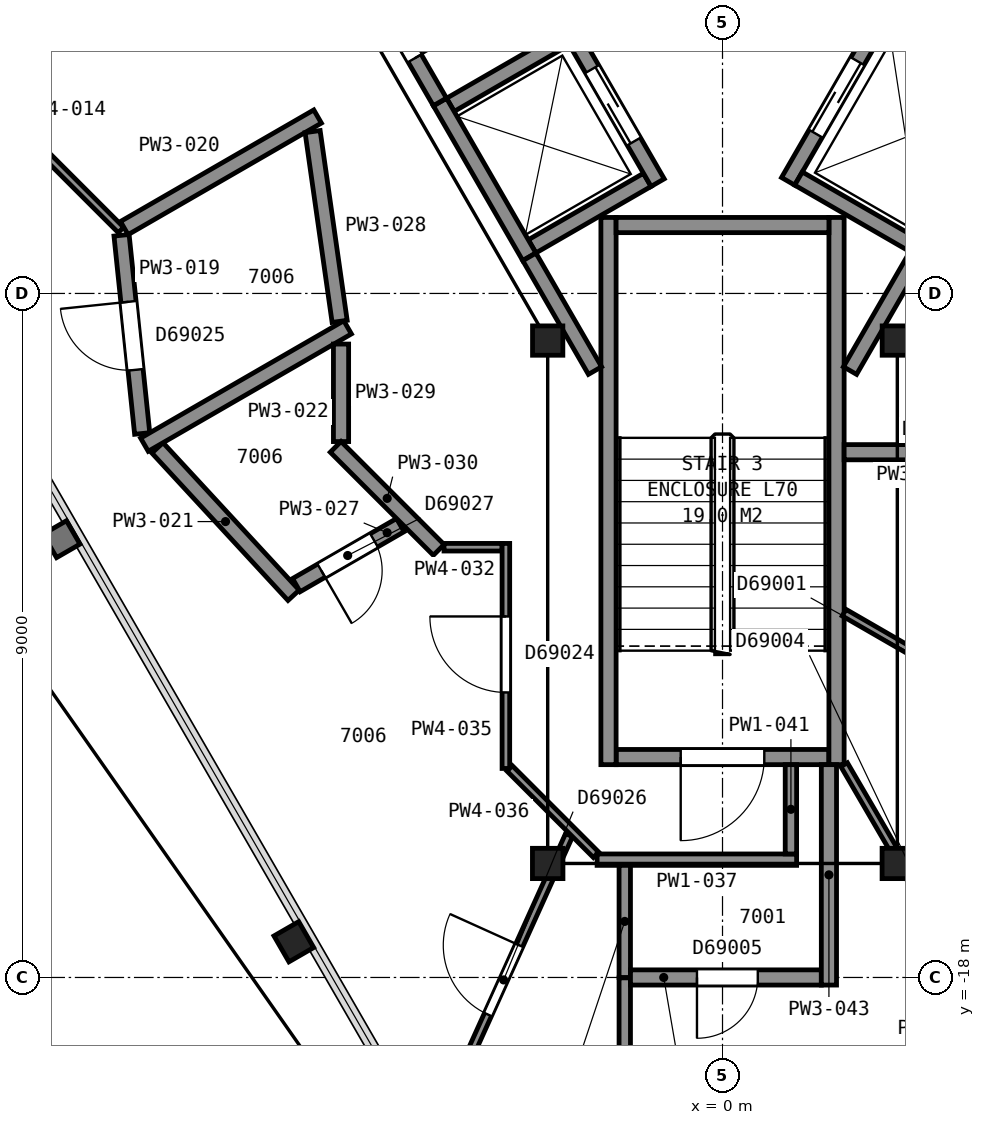
"""IFC4 building model, lengths in metres.
Left out: names, types, materials, properties, quantities, classifications, styles, units other than length and angle.
Written with IfcOpenShell. Run it as: python <this file> out.ifc"""

import sys

from ifc_helpers import new_model, si_unit, direction, frame, frame_2d, origin, origin_2d, place, context, subcontext, project, spatial, rectangle, i_section, extrude, element, fill, save


model = new_model("IFC4")
c1 = context("Model", 3, precision=1e-05, world=origin(), true_north=direction((0.0, 1.0)))
c2 = subcontext(c1, "Body", "Model", "MODEL_VIEW")
j1 = project(units=[si_unit("LENGTHUNIT", "METRE"), si_unit("PLANEANGLEUNIT", "RADIAN")], contexts=[c1])
p1 = place(None, origin())
s1 = spatial("IfcSite", under=j1, at=p1, CompositionType="ELEMENT")
p2 = place(p1, origin())
s2 = spatial("IfcBuilding", under=s1, at=p2, CompositionType="ELEMENT")
p3 = place(p2, frame((0.0, 0.0, 278.8)))
s3 = spatial("IfcBuildingStorey", under=s2, at=p3, CompositionType="ELEMENT", Elevation=278.8)
p4 = place(p3, frame((-5.64, -17.53, 0.0), z_axis=(0.0, 0.0, 1.0), x_axis=(-0.5, 0.866025403784, 0.0)))
e1 = element("IfcColumn", 1, at=p4, inside=s3, PredefinedType="COLUMN", context=c2, shape_type="SweptSolid", body=[
    extrude(i_section(OverallWidth=0.394, OverallDepth=0.376, WebThickness=0.017, FlangeThickness=0.028, FilletRadius=0.015, at=origin_2d()), origin(), (0.0, 0.0, 1.0), 3.7),
])
p5 = place(p3, frame((-2.3, -9.62, 0.0), z_axis=(0.0, 0.0, 1.0), x_axis=(1.0, 0.0, 0.0)))
e2 = element("IfcColumn", 2, at=p5, inside=s3, PredefinedType="COLUMN", context=c2, shape_type="SweptSolid", body=[
    extrude(i_section(OverallWidth=0.399, OverallDepth=0.386, WebThickness=0.021, FlangeThickness=0.033, FilletRadius=0.015, at=origin_2d()), origin(), (0.0, 0.0, 1.0), 3.7),
])
for number, where, z_axis, x_axis in (
    (3, (-2.3, -16.5, 0.0), (0.0, 0.0, 1.0), (-1.0, 0.0, 0.0)),
    (4, (2.3, -16.5, 0.0), (0.0, 0.0, 1.0), (-1.0, 0.0, 0.0)),
):
    element("IfcColumn", number, at=place(p3, frame(where, z_axis=z_axis, x_axis=x_axis)), inside=s3, PredefinedType="COLUMN", context=c2, shape_type="SweptSolid", body=[
        extrude(i_section(OverallWidth=0.401, OverallDepth=0.399, WebThickness=0.025, FlangeThickness=0.04, FilletRadius=0.015, at=origin_2d()), origin(), (0.0, 0.0, 1.0), 3.7),
    ])
p6 = place(p3, frame((2.3, -9.62, 0.0), z_axis=(0.0, 0.0, 1.0), x_axis=(1.0, 0.0, 0.0)))
e5 = element("IfcColumn", 5, at=p6, inside=s3, PredefinedType="COLUMN", context=c2, shape_type="SweptSolid", body=[
    extrude(i_section(OverallWidth=0.399, OverallDepth=0.386, WebThickness=0.021, FlangeThickness=0.033, FilletRadius=0.015, at=origin_2d()), origin(), (0.0, 0.0, 1.0), 3.7),
])
p7 = place(p3, frame((-1.4, -15.1, 0.0), z_axis=(0.0, 0.0, 1.0), x_axis=(1.0, 0.0, 0.0)))
e6 = element("IfcWall", 6, at=p7, inside=s3, PredefinedType="PARTITIONING", context=c2, shape_type="SweptSolid", body=[
    extrude(rectangle(XDim=2.8, YDim=0.2, at=frame_2d((1.4, 0.0))), origin(), (0.0, 0.0, 1.0), 3.45),
])
p8 = place(p7, frame((0.85, 0.0, 0.0)))
e7 = element("IfcOpeningElement", 7, at=p8, cuts=e6, PredefinedType="OPENING", context=c2, shape_type="SweptSolid", body=[
    extrude(rectangle(XDim=1.1, YDim=2.1, at=frame_2d((0.55, 1.05))), frame((0.0, 0.11, 0.0), z_axis=(0.0, -1.0, 0.0), x_axis=(1.0, 0.0, 0.0)), (0.0, 0.0, 1.0), 0.22),
])
for number, where, z_axis, x_axis in (
    (8, (1.5, -8.0, 0.0), (0.0, 0.0, 1.0), (0.0, -1.0, 0.0)),
    (9, (-1.5, -8.0, 0.0), (0.0, 0.0, 1.0), (0.0, -1.0, 0.0)),
):
    element("IfcWall", number, at=place(p3, frame(where, z_axis=z_axis, x_axis=x_axis)), inside=s3, PredefinedType="PARTITIONING", context=c2, shape_type="SweptSolid", body=[
        extrude(rectangle(XDim=7.2, YDim=0.2, at=frame_2d((3.6, 0.0))), origin(), (0.0, 0.0, 1.0), 3.45),
    ])
p9 = place(p3, frame((-1.4, -8.1, 0.0), z_axis=(0.0, 0.0, 1.0), x_axis=(1.0, 0.0, 0.0)))
e10 = element("IfcWall", 10, at=p9, inside=s3, PredefinedType="PARTITIONING", context=c2, shape_type="SweptSolid", body=[
    extrude(rectangle(XDim=2.8, YDim=0.2, at=frame_2d((1.4, 0.0))), origin(), (0.0, 0.0, 1.0), 3.45),
])
for number, where, z_axis, x_axis in (
    (11, (-2.505, -8.38, 0.0), (0.0, 0.0, 1.0), (0.866, 0.5, 0.0)),
    (12, (-3.58, -6.519, 0.0), (0.0, 0.0, 1.0), (0.866, 0.5, 0.0)),
):
    element("IfcWall", number, at=place(p3, frame(where, z_axis=z_axis, x_axis=x_axis)), inside=s3, PredefinedType="PARTITIONING", context=c2, shape_type="SweptSolid", body=[
        extrude(rectangle(XDim=1.75, YDim=0.2, at=frame_2d((0.875, 0.0))), origin(), (0.0, 0.0, 1.0), 3.7),
    ])
p10 = place(p3, frame((0.863, -7.525, 0.0), z_axis=(0.0, 0.0, 1.0), x_axis=(0.499990435942, 0.866030925526, 0.0)))
e13 = element("IfcWall", 13, at=p10, inside=s3, PredefinedType="PARTITIONING", context=c2, shape_type="SweptSolid", body=[
    extrude(rectangle(XDim=2.55, YDim=0.2, at=frame_2d((1.275, 0.0))), origin(), (0.0, 0.0, 1.0), 3.7),
])
p11 = place(p10, frame((0.725, 0.0, 0.0)))
e14 = element("IfcOpeningElement", 14, at=p11, cuts=e13, PredefinedType="OPENING", context=c2, shape_type="SweptSolid", body=[
    extrude(rectangle(XDim=1.1, YDim=2.1, at=frame_2d((0.55, 1.05))), frame((0.0, 0.11, 0.0), z_axis=(0.0, -1.0, 0.0), x_axis=(1.0, 0.0, 0.0)), (0.0, 0.0, 1.0), 0.22),
])
p12 = place(p3, frame((-0.853, -7.542, 0.0), z_axis=(0.0, 0.0, 1.0), x_axis=(-0.500016218704, 0.866016039709, 0.0)))
e15 = element("IfcWall", 15, at=p12, inside=s3, PredefinedType="PARTITIONING", context=c2, shape_type="SweptSolid", body=[
    extrude(rectangle(XDim=2.35, YDim=0.2, at=frame_2d((1.175, 0.0))), origin(), (0.0, 0.0, 1.0), 3.7),
])
p13 = place(p12, frame((0.625, 0.0, 0.0)))
e16 = element("IfcOpeningElement", 16, at=p13, cuts=e15, PredefinedType="OPENING", context=c2, shape_type="SweptSolid", body=[
    extrude(rectangle(XDim=1.1, YDim=2.1, at=frame_2d((0.55, 1.05))), frame((0.0, 0.11, 0.0), z_axis=(0.0, -1.0, 0.0), x_axis=(1.0, 0.0, 0.0)), (0.0, 0.0, 1.0), 0.22),
])
p14 = place(p3, frame((-2.542, -8.517, 0.0), z_axis=(0.0, 0.0, 1.0), x_axis=(-0.500016218704, 0.866016039709, 0.0)))
e17 = element("IfcWall", 17, at=p14, inside=s3, PredefinedType="PARTITIONING", context=c2, shape_type="SweptSolid", body=[
    extrude(rectangle(XDim=2.35, YDim=0.2, at=frame_2d((1.175, 0.0))), origin(), (0.0, 0.0, 1.0), 3.7),
])
for number, where, z_axis, x_axis in (
    (18, (3.69, -6.328, 0.0), (0.0, 0.0, 1.0), (-0.866, 0.5, 0.0)),
    (19, (2.515, -8.363, 0.0), (0.0, 0.0, 1.0), (-0.866, 0.5, 0.0)),
):
    element("IfcWall", number, at=place(p3, frame(where, z_axis=z_axis, x_axis=x_axis)), inside=s3, PredefinedType="PARTITIONING", context=c2, shape_type="SweptSolid", body=[
        extrude(rectangle(XDim=1.75, YDim=0.2, at=frame_2d((0.875, 0.0))), origin(), (0.0, 0.0, 1.0), 3.7),
    ])
p15 = place(p3, frame((-7.141, -0.551, 0.0), z_axis=(0.0, 0.0, 1.0), x_axis=(0.500001302854, -0.86602465158, 0.0)))
e20 = element("IfcWall", 20, at=p15, inside=s3, PredefinedType="PARTITIONING", context=c2, shape_type="SweptSolid", body=[
    extrude(rectangle(XDim=6.846, YDim=0.2, at=frame_2d((3.423, 0.0))), origin(), (0.0, 0.0, 1.0), 3.45),
])
p16 = place(p15, frame((4.983, 0.0, 0.0)))
e21 = element("IfcOpeningElement", 21, at=p16, cuts=e20, PredefinedType="OPENING", context=c2, shape_type="SweptSolid", body=[
    extrude(rectangle(XDim=1.2, YDim=2.1, at=frame_2d((0.6, 1.05))), frame((0.0, 0.11, 0.0), z_axis=(0.0, -1.0, 0.0), x_axis=(1.0, 0.0, 0.0)), (0.0, 0.0, 1.0), 0.22),
])
p17 = place(p3, frame((-2.541, -8.519, 0.0), z_axis=(0.0, 0.0, 1.0), x_axis=(0.500016142392, -0.86601608377, 0.0)))
e22 = element("IfcWall", 22, at=p17, inside=s3, PredefinedType="PARTITIONING", context=c2, shape_type="SweptSolid", body=[
    extrude(rectangle(XDim=1.727, YDim=0.2, at=frame_2d((0.864, 0.0))), origin(), (0.0, 0.0, 1.0), 3.45),
])
p18 = place(p3, frame((1.677, -10.015, 0.0), z_axis=(0.0, 0.0, 1.0), x_axis=(0.49983532306, 0.866120459187, 0.0)))
e23 = element("IfcWall", 23, at=p18, inside=s3, PredefinedType="PARTITIONING", context=c2, shape_type="SweptSolid", body=[
    extrude(rectangle(XDim=1.748, YDim=0.2, at=frame_2d((0.874, 0.0))), origin(), (0.0, 0.0, 1.0), 3.45),
])
p19 = place(p3, frame((-11.071, -5.008, 0.0), z_axis=(0.0, 0.0, 1.0), x_axis=(0.707079435951, -0.707134125365, 0.0)))
e24 = element("IfcWall", 24, at=p19, inside=s3, PredefinedType="PARTITIONING", context=c2, shape_type="SweptSolid", body=[
    extrude(rectangle(XDim=4.464, YDim=0.1, at=frame_2d((2.232, 0.0))), origin(), (0.0, 0.0, 1.0), 2.723),
])
p20 = place(p3, frame((-7.907, -8.235, 0.0), z_axis=(0.0, 0.0, 1.0), x_axis=(0.103623353624, -0.994616609847, 0.0)))
e25 = element("IfcWall", 25, at=p20, inside=s3, PredefinedType="PARTITIONING", context=c2, shape_type="SweptSolid", body=[
    extrude(rectangle(XDim=2.622, YDim=0.2, at=frame_2d((1.311, 0.0))), origin(), (0.0, 0.0, 1.0), 2.723),
])
p21 = place(p20, frame((0.88, 0.0, 0.0)))
e26 = element("IfcOpeningElement", 26, at=p21, cuts=e25, PredefinedType="OPENING", context=c2, shape_type="SweptSolid", body=[
    extrude(rectangle(XDim=0.9, YDim=2.1, at=frame_2d((0.45, 1.05))), frame((0.0, 0.11, 0.0), z_axis=(0.0, -1.0, 0.0), x_axis=(1.0, 0.0, 0.0)), (0.0, 0.0, 1.0), 0.22),
])
p22 = place(p3, frame((-7.871, -8.14, 0.0), z_axis=(0.0, 0.0, 1.0), x_axis=(0.866106676517, 0.49985920507, 0.0)))
e27 = element("IfcWall", 27, at=p22, inside=s3, PredefinedType="PARTITIONING", context=c2, shape_type="SweptSolid", body=[
    extrude(rectangle(XDim=2.936, YDim=0.2, at=frame_2d((1.468, 0.0))), origin(), (0.0, 0.0, 1.0), 2.723),
])
p23 = place(p3, frame((-7.434, -11.032, 0.0), z_axis=(0.0, 0.0, 1.0), x_axis=(0.678387636859, -0.734704167782, 0.0)))
e28 = element("IfcWall", 28, at=p23, inside=s3, PredefinedType="PARTITIONING", context=c2, shape_type="SweptSolid", body=[
    extrude(rectangle(XDim=2.64, YDim=0.2, at=frame_2d((1.32, 0.0))), origin(), (0.0, 0.0, 1.0), 2.723),
])
p24 = place(p3, frame((-7.606, -10.99, 0.0), z_axis=(0.0, 0.0, 1.0), x_axis=(0.865956409518, 0.500119482538, 0.0)))
e29 = element("IfcWall", 29, at=p24, inside=s3, PredefinedType="PARTITIONING", context=c2, shape_type="SweptSolid", body=[
    extrude(rectangle(XDim=3.087, YDim=0.2, at=frame_2d((1.543, 0.0))), origin(), (0.0, 0.0, 1.0), 2.723),
])
p25 = place(p3, frame((-5.607, -12.838, 0.0), z_axis=(0.0, 0.0, 1.0), x_axis=(0.866095534226, 0.499878510834, 0.0)))
e30 = element("IfcWall", 30, at=p25, inside=s3, PredefinedType="PARTITIONING", context=c2, shape_type="SweptSolid", body=[
    extrude(rectangle(XDim=1.58, YDim=0.2, at=frame_2d((0.79, 0.0))), origin(), (0.0, 0.0, 1.0), 2.723),
])
p26 = place(p25, frame((0.38, 0.0, 0.0)))
e31 = element("IfcOpeningElement", 31, at=p26, cuts=e30, PredefinedType="OPENING", context=c2, shape_type="SweptSolid", body=[
    extrude(rectangle(XDim=0.8, YDim=2.1, at=frame_2d((0.4, 1.05))), frame((0.0, 0.11, 0.0), z_axis=(0.0, -1.0, 0.0), x_axis=(1.0, 0.0, 0.0)), (0.0, 0.0, 1.0), 0.22),
])
p27 = place(p3, frame((-5.393, -6.871, 0.0), z_axis=(0.0, 0.0, 1.0), x_axis=(0.140960508483, -0.990015219604, 0.0)))
e32 = element("IfcWall", 32, at=p27, inside=s3, PredefinedType="PARTITIONING", context=c2, shape_type="SweptSolid", body=[
    extrude(rectangle(XDim=2.522, YDim=0.2, at=frame_2d((1.261, 0.0))), origin(), (0.0, 0.0, 1.0), 2.723),
])
p28 = place(p3, frame((-5.019, -10.949, 0.0), z_axis=(0.0, 0.0, 1.0), x_axis=(0.0, 1.0, 0.0)))
e33 = element("IfcWall", 33, at=p28, inside=s3, PredefinedType="PARTITIONING", context=c2, shape_type="SweptSolid", body=[
    extrude(rectangle(XDim=1.283, YDim=0.2, at=frame_2d((0.642, 0.0))), origin(), (0.0, 0.0, 1.0), 2.723),
])
p29 = place(p3, frame((-5.09, -11.018, 0.0), z_axis=(0.0, 0.0, 1.0), x_axis=(0.707106781187, -0.707106781187, 0.0)))
e34 = element("IfcWall", 34, at=p29, inside=s3, PredefinedType="PARTITIONING", context=c2, shape_type="SweptSolid", body=[
    extrude(rectangle(XDim=1.918, YDim=0.2, at=frame_2d((0.959, 0.0))), origin(), (0.0, 0.0, 1.0), 2.723),
])
p30 = place(p3, frame((-2.019, -16.127, 0.0), z_axis=(0.0, 0.0, 1.0), x_axis=(-0.411876718461, -0.911239578151, 0.0)))
e35 = element("IfcWall", 35, at=p30, inside=s3, PredefinedType="PARTITIONING", context=c2, shape_type="SweptSolid", body=[
    extrude(rectangle(XDim=4.376, YDim=0.1, at=frame_2d((2.188, 0.0))), origin(), (0.0, 0.0, 1.0), 2.723),
])
p31 = place(p30, frame((1.591, 0.0, 0.0)))
e36 = element("IfcOpeningElement", 36, at=p31, cuts=e35, PredefinedType="OPENING", context=c2, shape_type="SweptSolid", body=[
    extrude(rectangle(XDim=1.0, YDim=2.1, at=frame_2d((0.5, 1.05))), frame((0.0, 0.06, 0.0), z_axis=(0.0, -1.0, 0.0), x_axis=(1.0, 0.0, 0.0)), (0.0, 0.0, 1.0), 0.12),
])
p32 = place(p3, frame((-3.664, -12.339, 0.0), z_axis=(0.0, 0.0, 1.0), x_axis=(1.0, 0.0, 0.0)))
e37 = element("IfcWall", 37, at=p32, inside=s3, PredefinedType="PARTITIONING", context=c2, shape_type="SweptSolid", body=[
    extrude(rectangle(XDim=0.764, YDim=0.1, at=frame_2d((0.382, 0.0))), origin(), (0.0, 0.0, 1.0), 2.723),
])
p33 = place(p3, frame((-2.85, -15.25, 0.0), z_axis=(0.0, 0.0, 1.0), x_axis=(0.0, 1.0, 0.0)))
e38 = element("IfcWall", 38, at=p33, inside=s3, PredefinedType="PARTITIONING", context=c2, shape_type="SweptSolid", body=[
    extrude(rectangle(XDim=2.961, YDim=0.1, at=frame_2d((1.48, 0.0))), origin(), (0.0, 0.0, 1.0), 2.723),
])
p34 = place(p33, frame((1.0, 0.0, 0.0)))
e39 = element("IfcOpeningElement", 39, at=p34, cuts=e38, PredefinedType="OPENING", context=c2, shape_type="SweptSolid", body=[
    extrude(rectangle(XDim=1.0, YDim=2.1, at=frame_2d((0.5, 1.05))), frame((0.0, 0.06, 0.0), z_axis=(0.0, -1.0, 0.0), x_axis=(1.0, 0.0, 0.0)), (0.0, 0.0, 1.0), 0.12),
])
p35 = place(p3, frame((-2.801, -15.25, 0.0), z_axis=(0.0, 0.0, 1.0), x_axis=(0.707106781187, -0.707106781187, 0.0)))
e40 = element("IfcWall", 40, at=p35, inside=s3, PredefinedType="PARTITIONING", context=c2, shape_type="SweptSolid", body=[
    extrude(rectangle(XDim=1.608, YDim=0.1, at=frame_2d((0.804, 0.0))), origin(), (0.0, 0.0, 1.0), 2.723),
])
p36 = place(p3, frame((-1.65, -16.45, 0.0), z_axis=(0.0, 0.0, 1.0), x_axis=(1.0, 0.0, 0.0)))
e41 = element("IfcWall", 41, at=p36, inside=s3, PredefinedType="PARTITIONING", context=c2, shape_type="SweptSolid", body=[
    extrude(rectangle(XDim=2.625, YDim=0.15, at=frame_2d((1.312, 0.0))), origin(), (0.0, 0.0, 1.0), 2.723),
])
p37 = place(p3, frame((-1.286, -24.421, 0.0), z_axis=(0.0, 0.0, 1.0), x_axis=(0.0, 1.0, 0.0)))
e42 = element("IfcWall", 42, at=p37, inside=s3, PredefinedType="PARTITIONING", context=c2, shape_type="SweptSolid", body=[
    extrude(rectangle(XDim=6.416, YDim=0.15, at=frame_2d((3.208, 0.0))), origin(), (0.0, 0.0, 1.0), 2.723),
])
p38 = place(p3, frame((-1.286, -18.0, 0.0), z_axis=(0.0, 0.0, 1.0), x_axis=(0.0, 1.0, 0.0)))
e43 = element("IfcWall", 43, at=p38, inside=s3, PredefinedType="PARTITIONING", context=c2, shape_type="SweptSolid", body=[
    extrude(rectangle(XDim=1.475, YDim=0.15, at=frame_2d((0.738, 0.0))), origin(), (0.0, 0.0, 1.0), 2.723),
])
p39 = place(p3, frame((-1.211, -18.0, 0.0), z_axis=(0.0, 0.0, 1.0), x_axis=(1.0, 0.0, 0.0)))
e44 = element("IfcWall", 44, at=p39, inside=s3, PredefinedType="PARTITIONING", context=c2, shape_type="SweptSolid", body=[
    extrude(rectangle(XDim=2.511, YDim=0.2, at=frame_2d((1.255, 0.0))), origin(), (0.0, 0.0, 1.0), 2.723),
])
p40 = place(p39, frame((0.875, 0.0, 0.0)))
e45 = element("IfcOpeningElement", 45, at=p40, cuts=e44, PredefinedType="OPENING", context=c2, shape_type="SweptSolid", body=[
    extrude(rectangle(XDim=0.8, YDim=2.1, at=frame_2d((0.4, 1.05))), frame((0.0, 0.11, 0.0), z_axis=(0.0, -1.0, 0.0), x_axis=(1.0, 0.0, 0.0)), (0.0, 0.0, 1.0), 0.22),
])
p41 = place(p3, frame((0.9, -16.375, 0.0), z_axis=(0.0, 0.0, 1.0), x_axis=(0.0, 1.0, 0.0)))
e46 = element("IfcWall", 46, at=p41, inside=s3, PredefinedType="PARTITIONING", context=c2, shape_type="SweptSolid", body=[
    extrude(rectangle(XDim=1.175, YDim=0.15, at=frame_2d((0.587, 0.0))), origin(), (0.0, 0.0, 1.0), 2.723),
])
p42 = place(p3, frame((1.4, -18.1, 0.0), z_axis=(0.0, 0.0, 1.0), x_axis=(0.0, 1.0, 0.0)))
e47 = element("IfcWall", 47, at=p42, inside=s3, PredefinedType="PARTITIONING", context=c2, shape_type="SweptSolid", body=[
    extrude(rectangle(XDim=2.9, YDim=0.2, at=frame_2d((1.45, 0.0))), origin(), (0.0, 0.0, 1.0), 2.723),
])
p43 = place(p3, frame((4.137, -19.557, 0.0), z_axis=(0.0, 0.0, 1.0), x_axis=(-0.503229634544, 0.864152726615, 0.0)))
e48 = element("IfcWall", 48, at=p43, inside=s3, PredefinedType="PARTITIONING", context=c2, shape_type="SweptSolid", body=[
    extrude(rectangle(XDim=5.042, YDim=0.1, at=frame_2d((2.521, 0.0))), origin(), (0.0, 0.0, 1.0), 2.723),
])
p44 = place(p43, frame((2.042, 0.0, 0.0)))
e49 = element("IfcOpeningElement", 49, at=p44, cuts=e48, PredefinedType="OPENING", context=c2, shape_type="SweptSolid", body=[
    extrude(rectangle(XDim=1.0, YDim=2.1, at=frame_2d((0.5, 1.05))), frame((0.0, 0.06, 0.0), z_axis=(0.0, -1.0, 0.0), x_axis=(1.0, 0.0, 0.0)), (0.0, 0.0, 1.0), 0.12),
])
p45 = place(p3, frame((6.247, -15.883, 0.0), z_axis=(0.0, 0.0, 1.0), x_axis=(-0.866008267802, 0.500029679218, 0.0)))
e50 = element("IfcWall", 50, at=p45, inside=s3, PredefinedType="PARTITIONING", context=c2, shape_type="SweptSolid", body=[
    extrude(rectangle(XDim=5.365, YDim=0.1, at=frame_2d((2.683, 0.0))), origin(), (0.0, 0.0, 1.0), 2.723),
])
p46 = place(p45, frame((2.265, 0.0, 0.0)))
e51 = element("IfcOpeningElement", 51, at=p46, cuts=e50, PredefinedType="OPENING", context=c2, shape_type="SweptSolid", body=[
    extrude(rectangle(XDim=0.9, YDim=2.1, at=frame_2d((0.45, 1.05))), frame((0.0, 0.06, 0.0), z_axis=(0.0, -1.0, 0.0), x_axis=(1.0, 0.0, 0.0)), (0.0, 0.0, 1.0), 0.12),
])
p47 = place(p3, frame((1.6, -11.089, 0.0), z_axis=(0.0, 0.0, 1.0), x_axis=(1.0, 0.0, 0.0)))
e52 = element("IfcWall", 52, at=p47, inside=s3, PredefinedType="PARTITIONING", context=c2, shape_type="SweptSolid", body=[
    extrude(rectangle(XDim=1.909, YDim=0.2, at=frame_2d((0.955, 0.0))), origin(), (0.0, 0.0, 1.0), 2.723),
])
p48 = place(p8, origin())
e53 = element("IfcDoor", 53, at=p48, inside=s3, OperationType="SINGLE_SWING_LEFT", PredefinedType="DOOR", context=c2, shape_type="SweptSolid", body=[
    extrude(rectangle(XDim=1.1, YDim=2.1, at=frame_2d((0.55, 1.05))), frame((0.0, 0.025, 0.0), z_axis=(0.0, -1.0, 0.0), x_axis=(1.0, 0.0, 0.0)), (0.0, 0.0, 1.0), 0.05),
])
fill(e7, e53)
p49 = place(p13, origin())
e54 = element("IfcDoor", 54, at=p49, inside=s3, OperationType="SLIDING_TO_LEFT", PredefinedType="DOOR", context=c2, shape_type="SweptSolid", body=[
    extrude(rectangle(XDim=1.1, YDim=2.1, at=frame_2d((0.55, 1.05))), frame((0.0, 0.025, 0.0), z_axis=(0.0, -1.0, 0.0), x_axis=(1.0, 0.0, 0.0)), (0.0, 0.0, 1.0), 0.05),
])
fill(e16, e54)
p50 = place(p11, origin())
e55 = element("IfcDoor", 55, at=p50, inside=s3, OperationType="SLIDING_TO_LEFT", PredefinedType="DOOR", context=c2, shape_type="SweptSolid", body=[
    extrude(rectangle(XDim=1.1, YDim=2.1, at=frame_2d((0.55, 1.05))), frame((0.0, 0.025, 0.0), z_axis=(0.0, -1.0, 0.0), x_axis=(1.0, 0.0, 0.0)), (0.0, 0.0, 1.0), 0.05),
])
fill(e14, e55)
p51 = place(p16, origin())
e56 = element("IfcDoor", 56, at=p51, inside=s3, OperationType="SINGLE_SWING_RIGHT", PredefinedType="DOOR", context=c2, shape_type="SweptSolid", body=[
    extrude(rectangle(XDim=1.2, YDim=2.1, at=frame_2d((0.6, 1.05))), frame((0.0, 0.025, 0.0), z_axis=(0.0, -1.0, 0.0), x_axis=(1.0, 0.0, 0.0)), (0.0, 0.0, 1.0), 0.05),
])
fill(e21, e56)
p52 = place(p21, origin())
e57 = element("IfcDoor", 57, at=p52, inside=s3, OperationType="SINGLE_SWING_LEFT", PredefinedType="DOOR", context=c2, shape_type="SweptSolid", body=[
    extrude(rectangle(XDim=0.9, YDim=2.1, at=frame_2d((0.45, 1.05))), frame((0.0, 0.025, 0.0), z_axis=(0.0, -1.0, 0.0), x_axis=(1.0, 0.0, 0.0)), (0.0, 0.0, 1.0), 0.05),
])
fill(e26, e57)
p53 = place(p26, origin())
e58 = element("IfcDoor", 58, at=p53, inside=s3, OperationType="SINGLE_SWING_LEFT", PredefinedType="DOOR", context=c2, shape_type="SweptSolid", body=[
    extrude(rectangle(XDim=0.8, YDim=2.1, at=frame_2d((0.4, 1.05))), frame((0.0, 0.025, 0.0), z_axis=(0.0, -1.0, 0.0), x_axis=(1.0, 0.0, 0.0)), (0.0, 0.0, 1.0), 0.05),
])
fill(e31, e58)
p54 = place(p31, origin())
e59 = element("IfcDoor", 59, at=p54, inside=s3, OperationType="SINGLE_SWING_LEFT", PredefinedType="DOOR", context=c2, shape_type="SweptSolid", body=[
    extrude(rectangle(XDim=1.0, YDim=2.1, at=frame_2d((0.5, 1.05))), frame((0.0, 0.025, 0.0), z_axis=(0.0, -1.0, 0.0), x_axis=(1.0, 0.0, 0.0)), (0.0, 0.0, 1.0), 0.05),
])
fill(e36, e59)
p55 = place(p34, origin())
e60 = element("IfcDoor", 60, at=p55, inside=s3, OperationType="SINGLE_SWING_RIGHT", PredefinedType="DOOR", context=c2, shape_type="SweptSolid", body=[
    extrude(rectangle(XDim=1.0, YDim=2.1, at=frame_2d((0.5, 1.05))), frame((0.0, 0.025, 0.0), z_axis=(0.0, -1.0, 0.0), x_axis=(1.0, 0.0, 0.0)), (0.0, 0.0, 1.0), 0.05),
])
fill(e39, e60)
p56 = place(p40, origin())
e61 = element("IfcDoor", 61, at=p56, inside=s3, OperationType="SINGLE_SWING_LEFT", PredefinedType="DOOR", context=c2, shape_type="SweptSolid", body=[
    extrude(rectangle(XDim=0.8, YDim=2.1, at=frame_2d((0.4, 1.05))), frame((0.0, 0.025, 0.0), z_axis=(0.0, -1.0, 0.0), x_axis=(1.0, 0.0, 0.0)), (0.0, 0.0, 1.0), 0.05),
])
fill(e45, e61)
save(model, sys.argv[1])
